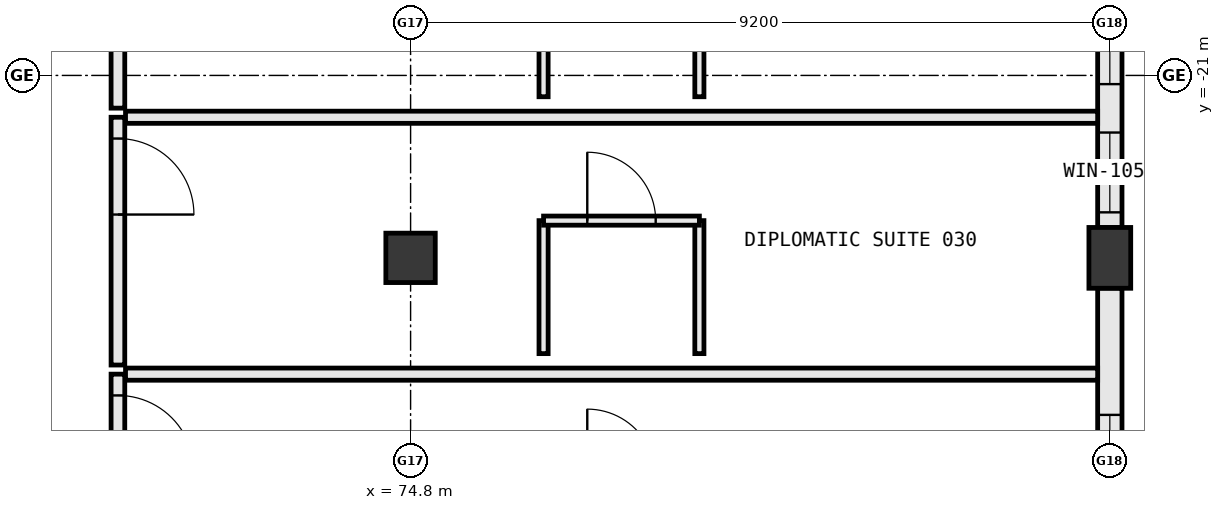
"""IFC4 building model, lengths in metres.
Left out: names, types, materials, properties, quantities, classifications, styles, units other than length and angle.
Written with IfcOpenShell. Run it as: python <this file> out.ifc"""

import sys

from ifc_helpers import new_model, si_unit, direction, frame, frame_2d, origin, origin_2d, place, context, subcontext, project, spatial, rectangle, extrude, element, fill, save


model = new_model("IFC4")
c1 = context("Model", 3, precision=1e-05, world=origin(), true_north=direction((0.0, 1.0)))
c2 = subcontext(c1, "Body", "Model", "MODEL_VIEW")
j1 = project(units=[si_unit("LENGTHUNIT", "METRE"), si_unit("PLANEANGLEUNIT", "RADIAN")], contexts=[c1])
p1 = place(None, origin())
s1 = spatial("IfcSite", under=j1, at=p1, CompositionType="ELEMENT")
p2 = place(p1, origin())
s2 = spatial("IfcBuilding", under=s1, at=p2, CompositionType="ELEMENT")
p3 = place(p2, frame((0.0, 0.0, 10.8)))
s3 = spatial("IfcBuildingStorey", under=s2, at=p3, CompositionType="ELEMENT", Elevation=10.8)
p4 = place(p3, frame((74.8, -23.4, 0.0), z_axis=(0.0, 0.0, 1.0), x_axis=(1.0, 0.0, 0.0)))
e1 = element("IfcColumn", 1, at=p4, inside=s3, PredefinedType="COLUMN", context=c2, shape_type="SweptSolid", body=[
    extrude(rectangle(XDim=0.65, YDim=0.65, at=origin_2d()), origin(), (0.0, 0.0, 1.0), 5.4),
])
p5 = place(p3, frame((84.0, -23.4, 0.0), z_axis=(0.0, 0.0, 1.0), x_axis=(1.0, 0.0, 0.0)))
e2 = element("IfcColumn", 2, at=p5, inside=s3, PredefinedType="PILASTER", context=c2, shape_type="SweptSolid", body=[
    extrude(rectangle(XDim=0.55, YDim=0.8, at=origin_2d()), origin(), (0.0, 0.0, 1.0), 5.4),
])
p6 = place(p3, frame((84.0, -27.802, 0.0), z_axis=(0.0, 0.0, 1.0), x_axis=(0.0, 1.0, 0.0)))
e3 = element("IfcWall", 3, at=p6, inside=s3, PredefinedType="STANDARD", context=c2, shape_type="SweptSolid", body=[
    extrude(rectangle(XDim=4.004, YDim=0.32, at=frame_2d((2.002, 0.0))), origin(), (0.0, 0.0, 1.0), 4.332),
])
p7 = place(p6, frame((0.536, 0.0, 0.85)))
e4 = element("IfcOpeningElement", 4, at=p7, cuts=e3, PredefinedType="OPENING", context=c2, shape_type="SweptSolid", body=[
    extrude(rectangle(XDim=1.8, YDim=1.85, at=frame_2d((0.9, 0.925))), frame((0.0, 0.172, 0.0), z_axis=(0.0, -1.0, 0.0), x_axis=(1.0, 0.0, 0.0)), (0.0, 0.0, 1.0), 0.344),
])
p8 = place(p3, frame((84.0, -23.002, 0.0), z_axis=(0.0, 0.0, 1.0), x_axis=(0.0, 1.0, 0.0)))
e5 = element("IfcWall", 5, at=p8, inside=s3, PredefinedType="STANDARD", context=c2, shape_type="SweptSolid", body=[
    extrude(rectangle(XDim=4.004, YDim=0.32, at=frame_2d((2.002, 0.0))), origin(), (0.0, 0.0, 1.0), 4.332),
])
p9 = place(p8, frame((0.201, 0.0, 0.85)))
e6 = element("IfcOpeningElement", 6, at=p9, cuts=e5, PredefinedType="OPENING", context=c2, shape_type="SweptSolid", body=[
    extrude(rectangle(XDim=1.05, YDim=1.45, at=frame_2d((0.525, 0.725))), frame((0.0, 0.172, 0.0), z_axis=(0.0, -1.0, 0.0), x_axis=(1.0, 0.0, 0.0)), (0.0, 0.0, 1.0), 0.344),
])
p10 = place(p8, frame((1.888, 0.0, 0.85)))
e7 = element("IfcOpeningElement", 7, at=p10, cuts=e5, PredefinedType="OPENING", context=c2, shape_type="SweptSolid", body=[
    extrude(rectangle(XDim=1.8, YDim=1.85, at=frame_2d((0.9, 0.925))), frame((0.0, 0.172, 0.0), z_axis=(0.0, -1.0, 0.0), x_axis=(1.0, 0.0, 0.0)), (0.0, 0.0, 1.0), 0.344),
])
p11 = place(p3, frame((70.95, -24.93, 0.0), z_axis=(0.0, 0.0, 1.0), x_axis=(0.0, -1.0, 0.0)))
e8 = element("IfcWall", 8, at=p11, inside=s3, PredefinedType="PARTITIONING", context=c2, shape_type="SweptSolid", body=[
    extrude(rectangle(XDim=3.26, YDim=0.18, at=frame_2d((1.63, 0.0))), origin(), (0.0, 0.0, 1.0), 4.8),
])
p12 = place(p11, frame((0.28, 0.0, 0.0)))
e9 = element("IfcOpeningElement", 9, at=p12, cuts=e8, PredefinedType="OPENING", context=c2, shape_type="SweptSolid", body=[
    extrude(rectangle(XDim=1.0, YDim=2.2, at=frame_2d((0.5, 1.1))), frame((0.0, 0.102, 0.0), z_axis=(0.0, -1.0, 0.0), x_axis=(1.0, 0.0, 0.0)), (0.0, 0.0, 1.0), 0.204),
])
p13 = place(p3, frame((71.05, -24.93, 0.0), z_axis=(0.0, 0.0, 1.0), x_axis=(1.0, 0.0, 0.0)))
e10 = element("IfcWall", 10, at=p13, inside=s3, PredefinedType="PARTITIONING", context=c2, shape_type="SweptSolid", body=[
    extrude(rectangle(XDim=12.79, YDim=0.16, at=frame_2d((6.395, 0.0))), origin(), (0.0, 0.0, 1.0), 4.8),
])
p14 = place(p3, frame((70.95, -21.55, 0.0), z_axis=(0.0, 0.0, 1.0), x_axis=(0.0, -1.0, 0.0)))
e11 = element("IfcWall", 11, at=p14, inside=s3, PredefinedType="PARTITIONING", context=c2, shape_type="SweptSolid", body=[
    extrude(rectangle(XDim=3.26, YDim=0.18, at=frame_2d((1.63, 0.0))), origin(), (0.0, 0.0, 1.0), 4.8),
])
p15 = place(p14, frame((0.28, 0.0, 0.0)))
e12 = element("IfcOpeningElement", 12, at=p15, cuts=e11, PredefinedType="OPENING", context=c2, shape_type="SweptSolid", body=[
    extrude(rectangle(XDim=1.0, YDim=2.2, at=frame_2d((0.5, 1.1))), frame((0.0, 0.102, 0.0), z_axis=(0.0, -1.0, 0.0), x_axis=(1.0, 0.0, 0.0)), (0.0, 0.0, 1.0), 0.204),
])
p16 = place(p3, frame((71.05, -21.55, 0.0), z_axis=(0.0, 0.0, 1.0), x_axis=(1.0, 0.0, 0.0)))
e13 = element("IfcWall", 13, at=p16, inside=s3, PredefinedType="PARTITIONING", context=c2, shape_type="SweptSolid", body=[
    extrude(rectangle(XDim=12.79, YDim=0.16, at=frame_2d((6.395, 0.0))), origin(), (0.0, 0.0, 1.0), 4.8),
])
for number, where, z_axis, x_axis in (
    (14, (76.55, -24.66, 0.0), (0.0, 0.0, 1.0), (0.0, 1.0, 0.0)),
    (15, (78.6, -24.66, 0.0), (0.0, 0.0, 1.0), (0.0, 1.0, 0.0)),
):
    element("IfcWall", number, at=place(p3, frame(where, z_axis=z_axis, x_axis=x_axis)), inside=s3, PredefinedType="PARTITIONING", context=c2, shape_type="SweptSolid", body=[
        extrude(rectangle(XDim=1.75, YDim=0.12, at=frame_2d((0.875, 0.0))), origin(), (0.0, 0.0, 1.0), 4.8),
    ])
p17 = place(p3, frame((76.55, -22.91, 0.0), z_axis=(0.0, 0.0, 1.0), x_axis=(1.0, 0.0, 0.0)))
e16 = element("IfcWall", 16, at=p17, inside=s3, PredefinedType="PARTITIONING", context=c2, shape_type="SweptSolid", body=[
    extrude(rectangle(XDim=2.05, YDim=0.12, at=frame_2d((1.025, 0.0))), origin(), (0.0, 0.0, 1.0), 4.8),
])
p18 = place(p17, frame((0.575, 0.0, 0.0)))
e17 = element("IfcOpeningElement", 17, at=p18, cuts=e16, PredefinedType="OPENING", context=c2, shape_type="SweptSolid", body=[
    extrude(rectangle(XDim=0.9, YDim=2.15, at=frame_2d((0.45, 1.075))), frame((0.0, 0.072, 0.0), z_axis=(0.0, -1.0, 0.0), x_axis=(1.0, 0.0, 0.0)), (0.0, 0.0, 1.0), 0.144),
])
p19 = place(p3, frame((70.95, -18.17, 0.0), z_axis=(0.0, 0.0, 1.0), x_axis=(0.0, -1.0, 0.0)))
e18 = element("IfcWall", 18, at=p19, inside=s3, PredefinedType="PARTITIONING", context=c2, shape_type="SweptSolid", body=[
    extrude(rectangle(XDim=3.26, YDim=0.18, at=frame_2d((1.63, 0.0))), origin(), (0.0, 0.0, 1.0), 4.8),
])
p20 = place(p19, frame((0.28, 0.0, 0.0)))
e19 = element("IfcOpeningElement", 19, at=p20, cuts=e18, PredefinedType="OPENING", context=c2, shape_type="SweptSolid", body=[
    extrude(rectangle(XDim=1.0, YDim=2.2, at=frame_2d((0.5, 1.1))), frame((0.0, 0.102, 0.0), z_axis=(0.0, -1.0, 0.0), x_axis=(1.0, 0.0, 0.0)), (0.0, 0.0, 1.0), 0.204),
])
for number, where, z_axis, x_axis in (
    (20, (76.55, -21.28, 0.0), (0.0, 0.0, 1.0), (0.0, 1.0, 0.0)),
    (21, (78.6, -21.28, 0.0), (0.0, 0.0, 1.0), (0.0, 1.0, 0.0)),
):
    element("IfcWall", number, at=place(p3, frame(where, z_axis=z_axis, x_axis=x_axis)), inside=s3, PredefinedType="PARTITIONING", context=c2, shape_type="SweptSolid", body=[
        extrude(rectangle(XDim=1.75, YDim=0.12, at=frame_2d((0.875, 0.0))), origin(), (0.0, 0.0, 1.0), 4.8),
    ])
p21 = place(p7, origin())
e22 = element("IfcWindow", 22, at=p21, inside=s3, PartitioningType="SINGLE_PANEL", PredefinedType="WINDOW", context=c2, shape_type="SweptSolid", body=[
    extrude(rectangle(XDim=1.8, YDim=1.85, at=frame_2d((0.9, 0.925))), frame((0.0, 0.03, 0.0), z_axis=(0.0, -1.0, 0.0), x_axis=(1.0, 0.0, 0.0)), (0.0, 0.0, 1.0), 0.06),
])
fill(e4, e22)
p22 = place(p9, origin())
e23 = element("IfcWindow", 23, at=p22, inside=s3, PartitioningType="SINGLE_PANEL", PredefinedType="WINDOW", context=c2, shape_type="SweptSolid", body=[
    extrude(rectangle(XDim=1.05, YDim=1.45, at=frame_2d((0.525, 0.725))), frame((0.0, 0.03, 0.0), z_axis=(0.0, -1.0, 0.0), x_axis=(1.0, 0.0, 0.0)), (0.0, 0.0, 1.0), 0.06),
])
fill(e6, e23)
p23 = place(p10, origin())
e24 = element("IfcWindow", 24, at=p23, inside=s3, PartitioningType="SINGLE_PANEL", PredefinedType="WINDOW", context=c2, shape_type="SweptSolid", body=[
    extrude(rectangle(XDim=1.8, YDim=1.85, at=frame_2d((0.9, 0.925))), frame((0.0, 0.03, 0.0), z_axis=(0.0, -1.0, 0.0), x_axis=(1.0, 0.0, 0.0)), (0.0, 0.0, 1.0), 0.06),
])
fill(e7, e24)
p24 = place(p12, origin())
e25 = element("IfcDoor", 25, at=p24, inside=s3, OperationType="SINGLE_SWING_RIGHT", PredefinedType="DOOR", context=c2, shape_type="SweptSolid", body=[
    extrude(rectangle(XDim=1.0, YDim=2.2, at=frame_2d((0.5, 1.1))), frame((0.0, 0.025, 0.0), z_axis=(0.0, -1.0, 0.0), x_axis=(1.0, 0.0, 0.0)), (0.0, 0.0, 1.0), 0.05),
])
fill(e9, e25)
p25 = place(p15, origin())
e26 = element("IfcDoor", 26, at=p25, inside=s3, OperationType="SINGLE_SWING_RIGHT", PredefinedType="DOOR", context=c2, shape_type="SweptSolid", body=[
    extrude(rectangle(XDim=1.0, YDim=2.2, at=frame_2d((0.5, 1.1))), frame((0.0, 0.025, 0.0), z_axis=(0.0, -1.0, 0.0), x_axis=(1.0, 0.0, 0.0)), (0.0, 0.0, 1.0), 0.05),
])
fill(e12, e26)
p26 = place(p18, origin())
e27 = element("IfcDoor", 27, at=p26, inside=s3, OperationType="SINGLE_SWING_LEFT", PredefinedType="DOOR", context=c2, shape_type="SweptSolid", body=[
    extrude(rectangle(XDim=0.9, YDim=2.15, at=frame_2d((0.45, 1.075))), frame((0.0, 0.025, 0.0), z_axis=(0.0, -1.0, 0.0), x_axis=(1.0, 0.0, 0.0)), (0.0, 0.0, 1.0), 0.05),
])
fill(e17, e27)
save(model, sys.argv[1])
